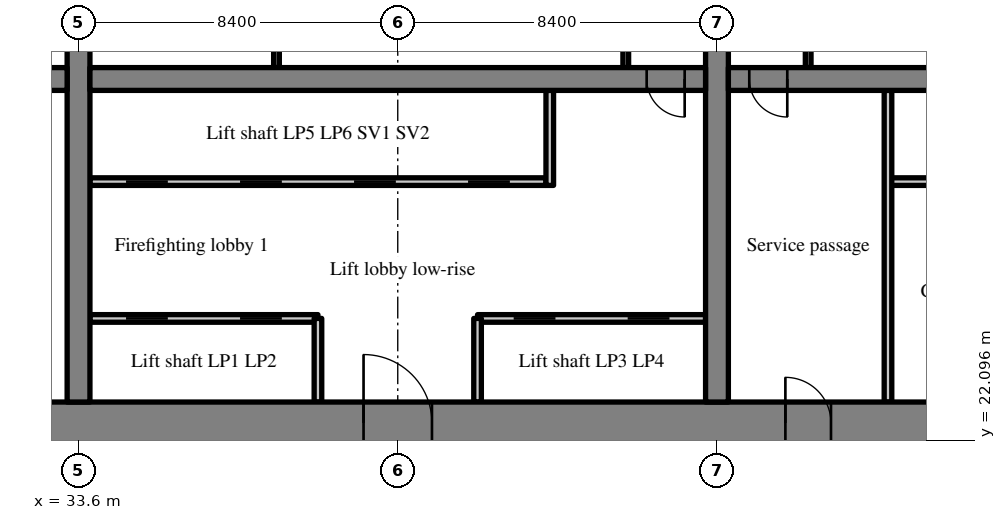
"""IFC4 building model, lengths in metres.
Left out: names, types, materials, properties, quantities, classifications, styles, units other than length and angle.
Written with IfcOpenShell. Run it as: python <this file> out.ifc"""

import sys

from ifc_helpers import new_model, si_unit, direction, frame, frame_2d, origin, place, context, subcontext, project, spatial, rectangle, extrude, source, transform, mapped, element, fill, save


model = new_model("IFC4")
c1 = context("Model", 3, precision=1e-05, world=origin(), true_north=direction((0.0, 1.0)))
c2 = subcontext(c1, "Body", "Model", "MODEL_VIEW")
j1 = project(units=[si_unit("LENGTHUNIT", "METRE"), si_unit("PLANEANGLEUNIT", "RADIAN")], contexts=[c1])
p1 = place(None, origin())
s1 = spatial("IfcSite", under=j1, at=p1, CompositionType="ELEMENT")
p2 = place(p1, origin())
s2 = spatial("IfcBuilding", under=s1, at=p2, CompositionType="ELEMENT")
p3 = place(p2, frame((0.0, 0.0, 6.0)))
s3 = spatial("IfcBuildingStorey", under=s2, at=p3, CompositionType="ELEMENT", Elevation=6.0)
m1 = source(origin(), c2, "Body", "SweptSolid", [
    extrude(rectangle(XDim=50.4, YDim=1.1, at=frame_2d((25.2, 0.0))), origin(), (0.0, 0.0, 1.0), 5.12),
])
p4 = place(p3, frame((25.2, 22.55, 0.0), z_axis=(0.0, 0.0, 1.0), x_axis=(1.0, 0.0, 0.0)))
e1 = element("IfcWall", 1, at=p4, inside=s3, PredefinedType="SHEAR", context=c2, shape_type="MappedRepresentation", body=[
    mapped(m1, transform((0.0, 0.0, 0.0), scale=1.0)),
])
m2 = source(origin(), c2, "Body", "SweptSolid", [
    extrude(rectangle(XDim=1.8, YDim=2.1, at=frame_2d((0.9, 1.05))), frame((0.0, 0.56, 0.0), z_axis=(0.0, -1.0, 0.0), x_axis=(1.0, 0.0, 0.0)), (0.0, 0.0, 1.0), 1.12),
])
p5 = place(p4, frame((15.9, 0.0, 0.0)))
e2 = element("IfcOpeningElement", 2, at=p5, cuts=e1, PredefinedType="OPENING", context=c2, shape_type="MappedRepresentation", body=[
    mapped(m2, transform((0.0, 0.0, 0.0), scale=1.0)),
])
m3 = source(origin(), c2, "Body", "SweptSolid", [
    extrude(rectangle(XDim=1.2, YDim=2.1, at=frame_2d((0.6, 1.05))), frame((0.0, 0.56, 0.0), z_axis=(0.0, -1.0, 0.0), x_axis=(1.0, 0.0, 0.0)), (0.0, 0.0, 1.0), 1.12),
])
p6 = place(p4, frame((27.0, 0.0, 0.0)))
e3 = element("IfcOpeningElement", 3, at=p6, cuts=e1, PredefinedType="OPENING", context=c2, shape_type="MappedRepresentation", body=[
    mapped(m3, transform((0.0, 0.0, 0.0), scale=1.0)),
])
m4 = source(origin(), c2, "Body", "SweptSolid", [
    extrude(rectangle(XDim=0.9, YDim=2.1, at=frame_2d((0.45, 1.05))), frame((0.0, 0.56, 0.0), z_axis=(0.0, -1.0, 0.0), x_axis=(1.0, 0.0, 0.0)), (0.0, 0.0, 1.0), 1.12),
])
p7 = place(p4, frame((34.5, 0.0, 0.0)))
e4 = element("IfcOpeningElement", 4, at=p7, cuts=e1, PredefinedType="OPENING", context=c2, shape_type="MappedRepresentation", body=[
    mapped(m4, transform((0.0, 0.0, 0.0), scale=1.0)),
])
p8 = place(p4, frame((31.5, 0.0, 0.0)))
e5 = element("IfcOpeningElement", 5, at=p8, cuts=e1, PredefinedType="OPENING", context=c2, shape_type="MappedRepresentation", body=[
    mapped(m4, transform((0.0, 0.0, 0.0), scale=1.0)),
])
p9 = place(p4, frame((39.75, 0.0, 0.0)))
e6 = element("IfcOpeningElement", 6, at=p9, cuts=e1, PredefinedType="OPENING", context=c2, shape_type="MappedRepresentation", body=[
    mapped(m4, transform((0.0, 0.0, 0.0), scale=1.0)),
])
p10 = place(p4, frame((36.75, 0.0, 0.0)))
e7 = element("IfcOpeningElement", 7, at=p10, cuts=e1, PredefinedType="OPENING", context=c2, shape_type="MappedRepresentation", body=[
    mapped(m4, transform((0.0, 0.0, 0.0), scale=1.0)),
])
p11 = place(p4, frame((6.425, 0.0, 0.0)))
e8 = element("IfcOpeningElement", 8, at=p11, cuts=e1, PredefinedType="OPENING", context=c2, shape_type="MappedRepresentation", body=[
    mapped(m3, transform((0.0, 0.0, 0.0), scale=1.0)),
])
p12 = place(p4, frame((47.675, 0.0, 0.0)))
e9 = element("IfcOpeningElement", 9, at=p12, cuts=e1, PredefinedType="OPENING", context=c2, shape_type="MappedRepresentation", body=[
    mapped(m3, transform((0.0, 0.0, 0.0), scale=1.0)),
])
m5 = source(origin(), c2, "Body", "SweptSolid", [
    extrude(rectangle(XDim=17.8, YDim=0.6, at=frame_2d((8.9, 0.0))), origin(), (0.0, 0.0, 1.0), 5.12),
])
p13 = place(p3, frame((33.6, 23.1, 0.0), z_axis=(0.0, 0.0, 1.0), x_axis=(0.0, 1.0, 0.0)))
e10 = element("IfcWall", 10, at=p13, inside=s3, PredefinedType="SHEAR", context=c2, shape_type="MappedRepresentation", body=[
    mapped(m5, transform((0.0, 0.0, 0.0), scale=1.0)),
])
m6 = source(origin(), c2, "Body", "SweptSolid", [
    extrude(rectangle(XDim=1.1, YDim=2.1, at=frame_2d((0.55, 1.05))), frame((0.0, 0.31, 0.0), z_axis=(0.0, -1.0, 0.0), x_axis=(1.0, 0.0, 0.0)), (0.0, 0.0, 1.0), 0.62),
])
p14 = place(p13, frame((12.35, 0.0, 0.0)))
e11 = element("IfcOpeningElement", 11, at=p14, cuts=e10, PredefinedType="OPENING", context=c2, shape_type="MappedRepresentation", body=[
    mapped(m6, transform((0.0, 0.0, 0.0), scale=1.0)),
])
p15 = place(p3, frame((50.4, 23.1, 0.0), z_axis=(0.0, 0.0, 1.0), x_axis=(0.0, 1.0, 0.0)))
e12 = element("IfcWall", 12, at=p15, inside=s3, PredefinedType="SHEAR", context=c2, shape_type="MappedRepresentation", body=[
    mapped(m5, transform((0.0, 0.0, 0.0), scale=1.0)),
])
p16 = place(p15, frame((12.35, 0.0, 0.0)))
e13 = element("IfcOpeningElement", 13, at=p16, cuts=e12, PredefinedType="OPENING", context=c2, shape_type="MappedRepresentation", body=[
    mapped(m6, transform((0.0, 0.0, 0.0), scale=1.0)),
])
m7 = source(origin(), c2, "Body", "SweptSolid", [
    extrude(rectangle(XDim=7.0, YDim=0.6, at=frame_2d((3.5, 0.0))), origin(), (0.0, 0.0, 1.0), 5.12),
])
p17 = place(p3, frame((26.3, 31.6, 0.0), z_axis=(0.0, 0.0, 1.0), x_axis=(1.0, 0.0, 0.0)))
e14 = element("IfcWall", 14, at=p17, inside=s3, PredefinedType="SHEAR", context=c2, shape_type="MappedRepresentation", body=[
    mapped(m7, transform((0.0, 0.0, 0.0), scale=1.0)),
])
p18 = place(p17, frame((5.375, 0.0, 0.0)))
e15 = element("IfcOpeningElement", 15, at=p18, cuts=e14, PredefinedType="OPENING", context=c2, shape_type="MappedRepresentation", body=[
    mapped(m6, transform((0.0, 0.0, 0.0), scale=1.0)),
])
m8 = source(origin(), c2, "Body", "SweptSolid", [
    extrude(rectangle(XDim=16.2, YDim=0.6, at=frame_2d((8.1, 0.0))), origin(), (0.0, 0.0, 1.0), 5.12),
])
p19 = place(p3, frame((33.9, 31.6, 0.0), z_axis=(0.0, 0.0, 1.0), x_axis=(1.0, 0.0, 0.0)))
e16 = element("IfcWall", 16, at=p19, inside=s3, PredefinedType="SHEAR", context=c2, shape_type="MappedRepresentation", body=[
    mapped(m8, transform((0.0, 0.0, 0.0), scale=1.0)),
])
m9 = source(origin(), c2, "Body", "SweptSolid", [
    extrude(rectangle(XDim=1.0, YDim=2.1, at=frame_2d((0.5, 1.05))), frame((0.0, 0.31, 0.0), z_axis=(0.0, -1.0, 0.0), x_axis=(1.0, 0.0, 0.0)), (0.0, 0.0, 1.0), 0.62),
])
p20 = place(p19, frame((14.65, 0.0, 0.0)))
e17 = element("IfcOpeningElement", 17, at=p20, cuts=e16, PredefinedType="OPENING", context=c2, shape_type="MappedRepresentation", body=[
    mapped(m9, transform((0.0, 0.0, 0.0), scale=1.0)),
])
m10 = source(origin(), c2, "Body", "SweptSolid", [
    extrude(rectangle(XDim=16.2, YDim=0.6, at=frame_2d((8.1, 0.0))), origin(), (0.0, 0.0, 1.0), 5.12),
])
p21 = place(p3, frame((50.7, 31.6, 0.0), z_axis=(0.0, 0.0, 1.0), x_axis=(1.0, 0.0, 0.0)))
e18 = element("IfcWall", 18, at=p21, inside=s3, PredefinedType="SHEAR", context=c2, shape_type="MappedRepresentation", body=[
    mapped(m10, transform((0.0, 0.0, 0.0), scale=1.0)),
])
p22 = place(p21, frame((0.55, 0.0, 0.0)))
e19 = element("IfcOpeningElement", 19, at=p22, cuts=e18, PredefinedType="OPENING", context=c2, shape_type="MappedRepresentation", body=[
    mapped(m9, transform((0.0, 0.0, 0.0), scale=1.0)),
])
m11 = source(origin(), c2, "Body", "SweptSolid", [
    extrude(rectangle(XDim=6.0, YDim=0.2, at=frame_2d((3.0, 0.0))), origin(), (0.0, 0.0, 1.0), 5.12),
])
p23 = place(p3, frame((33.9, 25.3, 0.0), z_axis=(0.0, 0.0, 1.0), x_axis=(1.0, 0.0, 0.0)))
e20 = element("IfcWall", 20, at=p23, inside=s3, PredefinedType="SOLIDWALL", context=c2, shape_type="MappedRepresentation", body=[
    mapped(m11, transform((0.0, 0.0, 0.0), scale=1.0)),
])
m12 = source(origin(), c2, "Body", "SweptSolid", [
    extrude(rectangle(XDim=1.1, YDim=2.1, at=frame_2d((0.55, 1.05))), frame((0.0, 0.11, 0.0), z_axis=(0.0, -1.0, 0.0), x_axis=(1.0, 0.0, 0.0)), (0.0, 0.0, 1.0), 0.22),
])
p24 = place(p23, frame((0.95, 0.0, 0.0)))
e21 = element("IfcOpeningElement", 21, at=p24, cuts=e20, PredefinedType="OPENING", context=c2, shape_type="MappedRepresentation", body=[
    mapped(m12, transform((0.0, 0.0, 0.0), scale=1.0)),
])
p25 = place(p23, frame((3.95, 0.0, 0.0)))
e22 = element("IfcOpeningElement", 22, at=p25, cuts=e20, PredefinedType="OPENING", context=c2, shape_type="MappedRepresentation", body=[
    mapped(m12, transform((0.0, 0.0, 0.0), scale=1.0)),
])
p26 = place(p3, frame((44.1, 25.3, 0.0), z_axis=(0.0, 0.0, 1.0), x_axis=(1.0, 0.0, 0.0)))
e23 = element("IfcWall", 23, at=p26, inside=s3, PredefinedType="SOLIDWALL", context=c2, shape_type="MappedRepresentation", body=[
    mapped(m11, transform((0.0, 0.0, 0.0), scale=1.0)),
])
p27 = place(p26, frame((0.95, 0.0, 0.0)))
e24 = element("IfcOpeningElement", 24, at=p27, cuts=e23, PredefinedType="OPENING", context=c2, shape_type="MappedRepresentation", body=[
    mapped(m12, transform((0.0, 0.0, 0.0), scale=1.0)),
])
p28 = place(p26, frame((3.95, 0.0, 0.0)))
e25 = element("IfcOpeningElement", 25, at=p28, cuts=e23, PredefinedType="OPENING", context=c2, shape_type="MappedRepresentation", body=[
    mapped(m12, transform((0.0, 0.0, 0.0), scale=1.0)),
])
m13 = source(origin(), c2, "Body", "SweptSolid", [
    extrude(rectangle(XDim=12.0, YDim=0.2, at=frame_2d((6.0, 0.0))), origin(), (0.0, 0.0, 1.0), 5.12),
])
p29 = place(p3, frame((33.9, 28.9, 0.0), z_axis=(0.0, 0.0, 1.0), x_axis=(1.0, 0.0, 0.0)))
e26 = element("IfcWall", 26, at=p29, inside=s3, PredefinedType="SOLIDWALL", context=c2, shape_type="MappedRepresentation", body=[
    mapped(m13, transform((0.0, 0.0, 0.0), scale=1.0)),
])
p30 = place(p29, frame((0.95, 0.0, 0.0)))
e27 = element("IfcOpeningElement", 27, at=p30, cuts=e26, PredefinedType="OPENING", context=c2, shape_type="MappedRepresentation", body=[
    mapped(m12, transform((0.0, 0.0, 0.0), scale=1.0)),
])
p31 = place(p29, frame((3.95, 0.0, 0.0)))
e28 = element("IfcOpeningElement", 28, at=p31, cuts=e26, PredefinedType="OPENING", context=c2, shape_type="MappedRepresentation", body=[
    mapped(m12, transform((0.0, 0.0, 0.0), scale=1.0)),
])
p32 = place(p29, frame((6.95, 0.0, 0.0)))
e29 = element("IfcOpeningElement", 29, at=p32, cuts=e26, PredefinedType="OPENING", context=c2, shape_type="MappedRepresentation", body=[
    mapped(m12, transform((0.0, 0.0, 0.0), scale=1.0)),
])
p33 = place(p29, frame((9.95, 0.0, 0.0)))
e30 = element("IfcOpeningElement", 30, at=p33, cuts=e26, PredefinedType="OPENING", context=c2, shape_type="MappedRepresentation", body=[
    mapped(m12, transform((0.0, 0.0, 0.0), scale=1.0)),
])
m14 = source(origin(), c2, "Body", "SweptSolid", [
    extrude(rectangle(XDim=2.2, YDim=0.2, at=frame_2d((1.1, 0.0))), origin(), (0.0, 0.0, 1.0), 5.12),
])
for number, where, z_axis, x_axis in (
    (31, (39.9, 23.1, 0.0), (0.0, 0.0, 1.0), (0.0, 1.0, 0.0)),
    (32, (44.1, 23.1, 0.0), (0.0, 0.0, 1.0), (0.0, 1.0, 0.0)),
):
    element("IfcWall", number, at=place(p3, frame(where, z_axis=z_axis, x_axis=x_axis)), inside=s3, PredefinedType="SOLIDWALL", context=c2, shape_type="MappedRepresentation", body=[
        mapped(m14, transform((0.0, 0.0, 0.0), scale=1.0)),
    ])
m15 = source(origin(), c2, "Body", "SweptSolid", [
    extrude(rectangle(XDim=2.5, YDim=0.2, at=frame_2d((1.25, 0.0))), origin(), (0.0, 0.0, 1.0), 5.12),
])
p34 = place(p3, frame((46.0, 28.8, 0.0), z_axis=(0.0, 0.0, 1.0), x_axis=(0.0, 1.0, 0.0)))
e33 = element("IfcWall", 33, at=p34, inside=s3, PredefinedType="SOLIDWALL", context=c2, shape_type="MappedRepresentation", body=[
    mapped(m15, transform((0.0, 0.0, 0.0), scale=1.0)),
])
m16 = source(origin(), c2, "Body", "SweptSolid", [
    extrude(rectangle(XDim=3.1, YDim=0.15, at=frame_2d((1.55, 0.0))), origin(), (0.0, 0.0, 1.0), 5.12),
])
for number, where, z_axis, x_axis in (
    (34, (48.0, 31.9, 0.0), (0.0, 0.0, 1.0), (0.0, 1.0, 0.0)),
    (35, (38.809, 31.9, 0.0), (0.0, 0.0, 1.0), (0.0, 1.0, 0.0)),
):
    element("IfcWall", number, at=place(p3, frame(where, z_axis=z_axis, x_axis=x_axis)), inside=s3, PredefinedType="PARTITIONING", context=c2, shape_type="MappedRepresentation", body=[
        mapped(m16, transform((0.0, 0.0, 0.0), scale=1.0)),
    ])
p35 = place(p3, frame((60.9, 28.9, 0.0), z_axis=(0.0, 0.0, 1.0), x_axis=(-1.0, 0.0, 0.0)))
e36 = element("IfcWall", 36, at=p35, inside=s3, PredefinedType="SOLIDWALL", context=c2, shape_type="MappedRepresentation", body=[
    mapped(m11, transform((0.0, 0.0, 0.0), scale=1.0)),
])
m17 = source(origin(), c2, "Body", "SweptSolid", [
    extrude(rectangle(XDim=8.2, YDim=0.2, at=frame_2d((4.1, 0.0))), origin(), (0.0, 0.0, 1.0), 5.12),
])
p36 = place(p3, frame((54.9, 23.1, 0.0), z_axis=(0.0, 0.0, 1.0), x_axis=(0.0, 1.0, 0.0)))
e37 = element("IfcWall", 37, at=p36, inside=s3, PredefinedType="PARTITIONING", context=c2, shape_type="MappedRepresentation", body=[
    mapped(m17, transform((0.0, 0.0, 0.0), scale=1.0)),
])
p37 = place(p3, frame((52.8, 31.9, 0.0), z_axis=(0.0, 0.0, 1.0), x_axis=(0.0, 1.0, 0.0)))
e38 = element("IfcWall", 38, at=p37, inside=s3, PredefinedType="PARTITIONING", context=c2, shape_type="MappedRepresentation", body=[
    mapped(m16, transform((0.0, 0.0, 0.0), scale=1.0)),
])
m18 = source(origin(), c2, "Body", "SweptSolid", [
    extrude(rectangle(XDim=1.8, YDim=2.1, at=frame_2d((0.9, 1.05))), frame((0.0, 0.325, 0.0), z_axis=(0.0, -1.0, 0.0), x_axis=(1.0, 0.0, 0.0)), (0.0, 0.0, 1.0), 0.05),
])
p38 = place(p5, origin())
e39 = element("IfcDoor", 39, at=p38, inside=s3, OperationType="DOUBLE_DOOR_SINGLE_SWING", PredefinedType="DOOR", context=c2, shape_type="MappedRepresentation", body=[
    mapped(m18, transform((0.0, 0.0, 0.0), scale=1.0)),
])
fill(e2, e39)
m19 = source(origin(), c2, "Body", "SweptSolid", [
    extrude(rectangle(XDim=1.0, YDim=2.1, at=frame_2d((0.5, 1.05))), frame((0.0, 0.025, 0.0), z_axis=(0.0, -1.0, 0.0), x_axis=(1.0, 0.0, 0.0)), (0.0, 0.0, 1.0), 0.05),
])
p39 = place(p20, origin())
e40 = element("IfcDoor", 40, at=p39, inside=s3, OperationType="SINGLE_SWING_RIGHT", PredefinedType="DOOR", context=c2, shape_type="MappedRepresentation", body=[
    mapped(m19, transform((0.0, 0.0, 0.0), scale=1.0)),
])
fill(e17, e40)
m20 = source(origin(), c2, "Body", "SweptSolid", [
    extrude(rectangle(XDim=1.1, YDim=2.1, at=frame_2d((0.55, 1.05))), frame((0.0, 0.025, 0.0), z_axis=(0.0, -1.0, 0.0), x_axis=(1.0, 0.0, 0.0)), (0.0, 0.0, 1.0), 0.05),
])
p40 = place(p24, origin())
e41 = element("IfcDoor", 41, at=p40, inside=s3, OperationType="SLIDING_TO_LEFT", PredefinedType="DOOR", context=c2, shape_type="MappedRepresentation", body=[
    mapped(m20, transform((0.0, 0.0, 0.0), scale=1.0)),
])
fill(e21, e41)
p41 = place(p25, origin())
e42 = element("IfcDoor", 42, at=p41, inside=s3, OperationType="SLIDING_TO_RIGHT", PredefinedType="DOOR", context=c2, shape_type="MappedRepresentation", body=[
    mapped(m20, transform((0.0, 0.0, 0.0), scale=1.0)),
])
fill(e22, e42)
p42 = place(p27, origin())
e43 = element("IfcDoor", 43, at=p42, inside=s3, OperationType="SLIDING_TO_LEFT", PredefinedType="DOOR", context=c2, shape_type="MappedRepresentation", body=[
    mapped(m20, transform((0.0, 0.0, 0.0), scale=1.0)),
])
fill(e24, e43)
p43 = place(p28, origin())
e44 = element("IfcDoor", 44, at=p43, inside=s3, OperationType="SLIDING_TO_RIGHT", PredefinedType="DOOR", context=c2, shape_type="MappedRepresentation", body=[
    mapped(m20, transform((0.0, 0.0, 0.0), scale=1.0)),
])
fill(e25, e44)
p44 = place(p30, origin())
e45 = element("IfcDoor", 45, at=p44, inside=s3, OperationType="SLIDING_TO_LEFT", PredefinedType="DOOR", context=c2, shape_type="MappedRepresentation", body=[
    mapped(m20, transform((0.0, 0.0, 0.0), scale=1.0)),
])
fill(e27, e45)
p45 = place(p31, origin())
e46 = element("IfcDoor", 46, at=p45, inside=s3, OperationType="SLIDING_TO_RIGHT", PredefinedType="DOOR", context=c2, shape_type="MappedRepresentation", body=[
    mapped(m20, transform((0.0, 0.0, 0.0), scale=1.0)),
])
fill(e28, e46)
p46 = place(p32, origin())
e47 = element("IfcDoor", 47, at=p46, inside=s3, OperationType="SLIDING_TO_LEFT", PredefinedType="DOOR", context=c2, shape_type="MappedRepresentation", body=[
    mapped(m20, transform((0.0, 0.0, 0.0), scale=1.0)),
])
fill(e29, e47)
p47 = place(p33, origin())
e48 = element("IfcDoor", 48, at=p47, inside=s3, OperationType="SLIDING_TO_RIGHT", PredefinedType="DOOR", context=c2, shape_type="MappedRepresentation", body=[
    mapped(m20, transform((0.0, 0.0, 0.0), scale=1.0)),
])
fill(e30, e48)
m21 = source(origin(), c2, "Body", "SweptSolid", [
    extrude(rectangle(XDim=1.2, YDim=2.1, at=frame_2d((0.6, 1.05))), frame((0.0, 0.325, 0.0), z_axis=(0.0, -1.0, 0.0), x_axis=(1.0, 0.0, 0.0)), (0.0, 0.0, 1.0), 0.05),
])
p48 = place(p6, origin())
e49 = element("IfcDoor", 49, at=p48, inside=s3, OperationType="SINGLE_SWING_LEFT", PredefinedType="DOOR", context=c2, shape_type="MappedRepresentation", body=[
    mapped(m21, transform((0.0, 0.0, 0.0), scale=1.0)),
])
fill(e3, e49)
p49 = place(p22, origin())
e50 = element("IfcDoor", 50, at=p49, inside=s3, OperationType="SINGLE_SWING_RIGHT", PredefinedType="DOOR", context=c2, shape_type="MappedRepresentation", body=[
    mapped(m19, transform((0.0, 0.0, 0.0), scale=1.0)),
])
fill(e19, e50)
save(model, sys.argv[1])
